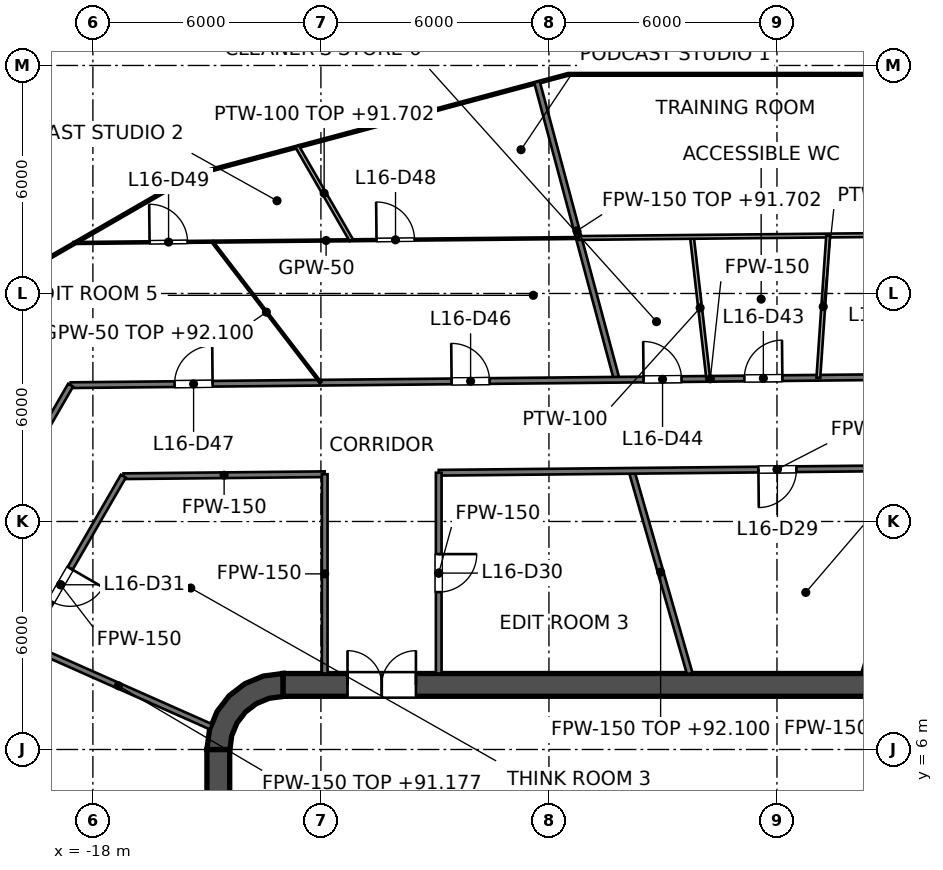
"""IFC4 building model, lengths in metres.
Left out: names, types, materials, properties, quantities, classifications, styles, units other than length and angle.
Written with IfcOpenShell. Run it as: python <this file> out.ifc"""

import sys

from ifc_helpers import new_model, si_unit, direction, frame, frame_2d, origin, place, context, subcontext, project, spatial, polyline, rectangle, outline, extrude, element, fill, save


model = new_model("IFC4")
c1 = context("Model", 3, precision=1e-05, world=origin(), true_north=direction((0.0, 1.0)))
c2 = subcontext(c1, "Body", "Model", "MODEL_VIEW")
j1 = project(units=[si_unit("LENGTHUNIT", "METRE"), si_unit("PLANEANGLEUNIT", "RADIAN")], contexts=[c1])
p1 = place(None, origin())
s1 = spatial("IfcSite", under=j1, at=p1, CompositionType="ELEMENT")
p2 = place(p1, origin())
s2 = spatial("IfcBuilding", under=s1, at=p2, CompositionType="ELEMENT")
p3 = place(p2, frame((0.0, 0.0, 88.2)))
s3 = spatial("IfcBuildingStorey", under=s2, at=p3, CompositionType="ELEMENT", Elevation=88.2)
p4 = place(p3, frame((-13.0, 7.7, 0.0), z_axis=(0.0, 0.0, 1.0), x_axis=(1.0, 0.0, 0.0)))
e1 = element("IfcWall", 1, at=p4, inside=s3, PredefinedType="SHEAR", context=c2, shape_type="SweptSolid", body=[
    extrude(rectangle(XDim=26.0, YDim=0.6, at=frame_2d((13.0, 0.0))), origin(), (0.0, 0.0, 1.0), 4.2),
])
p5 = place(p4, frame((1.7, 0.0, 0.0)))
e2 = element("IfcOpeningElement", 2, at=p5, cuts=e1, PredefinedType="OPENING", context=c2, shape_type="SweptSolid", body=[
    extrude(rectangle(XDim=1.8, YDim=2.1, at=frame_2d((0.9, 1.05))), frame((0.0, 0.3, 0.0), z_axis=(0.0, -1.0, 0.0), x_axis=(1.0, 0.0, 0.0)), (0.0, 0.0, 1.0), 0.6),
])
p6 = place(p4, frame((22.5, 0.0, 0.0)))
e3 = element("IfcOpeningElement", 3, at=p6, cuts=e1, PredefinedType="OPENING", context=c2, shape_type="SweptSolid", body=[
    extrude(rectangle(XDim=1.8, YDim=2.1, at=frame_2d((0.9, 1.05))), frame((0.0, 0.3, 0.0), z_axis=(0.0, -1.0, 0.0), x_axis=(1.0, 0.0, 0.0)), (0.0, 0.0, 1.0), 0.6),
])
p7 = place(p3, frame((-14.7, -6.0, 0.0), z_axis=(0.0, 0.0, 1.0), x_axis=(0.0, 1.0, 0.0)))
e4 = element("IfcWall", 4, at=p7, inside=s3, PredefinedType="SHEAR", context=c2, shape_type="SweptSolid", body=[
    extrude(rectangle(XDim=12.0, YDim=0.6, at=frame_2d((6.0, 0.0))), origin(), (0.0, 0.0, 1.0), 4.2),
])
p8 = place(p3, origin())
e5 = element("IfcWall", 5, at=p8, inside=s3, PredefinedType="SHEAR", context=c2, shape_type="SweptSolid", body=[
    extrude(outline(polyline([(-15.0, 6.0), (-14.395, 6.0), (-14.347, 6.361), (-14.208, 6.698), (-13.986, 6.986), (-13.698, 7.208), (-13.361, 7.347), (-13.0, 7.395), (-13.0, 8.0), (-13.518, 7.932), (-14.0, 7.732), (-14.414, 7.414), (-14.732, 7.0), (-14.932, 6.518), (-15.0, 6.0)])), origin(), (0.0, 0.0, 1.0), 4.2),
])
p9 = place(p3, frame((-1.5, 4.1, 0.0), z_axis=(0.0, 0.0, 1.0), x_axis=(0.0, 1.0, 0.0)))
e6 = element("IfcWall", 6, at=p9, inside=s3, PredefinedType="PARTITIONING", context=c2, shape_type="SweptSolid", body=[
    extrude(rectangle(XDim=2.5, YDim=0.15, at=frame_2d((1.25, 0.0))), origin(), (0.0, 0.0, 1.0), 3.9),
])
p10 = place(p9, frame((0.8, 0.0, 0.0)))
e7 = element("IfcOpeningElement", 7, at=p10, cuts=e6, PredefinedType="OPENING", context=c2, shape_type="SweptSolid", body=[
    extrude(rectangle(XDim=0.9, YDim=2.1, at=frame_2d((0.45, 1.05))), frame((0.0, 0.075, 0.0), z_axis=(0.0, -1.0, 0.0), x_axis=(1.0, 0.0, 0.0)), (0.0, 0.0, 1.0), 0.15),
])
p11 = place(p3, frame((-9.0, 4.1, 0.0), z_axis=(0.0, 0.0, 1.0), x_axis=(0.0, 1.0, 0.0)))
e8 = element("IfcWall", 8, at=p11, inside=s3, PredefinedType="SOLIDWALL", context=c2, shape_type="SweptSolid", body=[
    extrude(rectangle(XDim=2.5, YDim=0.25, at=frame_2d((1.25, 0.0))), origin(), (0.0, 0.0, 1.0), 4.05),
])
p12 = place(p11, frame((0.65, 0.0, 0.0)))
e9 = element("IfcOpeningElement", 9, at=p12, cuts=e8, PredefinedType="OPENING", context=c2, shape_type="SweptSolid", body=[
    extrude(rectangle(XDim=1.2, YDim=2.1, at=frame_2d((0.6, 1.05))), frame((0.0, 0.125, 0.0), z_axis=(0.0, -1.0, 0.0), x_axis=(1.0, 0.0, 0.0)), (0.0, 0.0, 1.0), 0.25),
])
p13 = place(p3, frame((-3.15, 4.1, 0.0), z_axis=(0.0, 0.0, 1.0), x_axis=(0.0, 1.0, 0.0)))
e10 = element("IfcWall", 10, at=p13, inside=s3, PredefinedType="SOLIDWALL", context=c2, shape_type="SweptSolid", body=[
    extrude(rectangle(XDim=2.5, YDim=0.25, at=frame_2d((1.25, 0.0))), origin(), (0.0, 0.0, 1.0), 4.05),
])
p14 = place(p3, frame((-9.125, 7.0, 0.0), z_axis=(0.0, 0.0, 1.0), x_axis=(1.0, 0.0, 0.0)))
e11 = element("IfcWall", 11, at=p14, inside=s3, PredefinedType="SOLIDWALL", context=c2, shape_type="SweptSolid", body=[
    extrude(rectangle(XDim=18.25, YDim=0.8, at=frame_2d((9.125, 0.0))), origin(), (0.0, 0.0, 1.0), 4.05),
])
p15 = place(p3, frame((-11.8, -7.4, 0.0), z_axis=(0.0, 0.0, 1.0), x_axis=(0.0, 1.0, 0.0)))
e12 = element("IfcWall", 12, at=p15, inside=s3, PredefinedType="SOLIDWALL", context=c2, shape_type="SweptSolid", body=[
    extrude(rectangle(XDim=14.8, YDim=0.4, at=frame_2d((7.4, 0.0))), origin(), (0.0, 0.0, 1.0), 4.05),
])
p16 = place(p15, frame((11.2, 0.0, 0.0)))
e13 = element("IfcOpeningElement", 13, at=p16, cuts=e12, PredefinedType="OPENING", context=c2, shape_type="SweptSolid", body=[
    extrude(rectangle(XDim=1.1, YDim=2.1, at=frame_2d((0.55, 1.05))), frame((0.0, 0.2, 0.0), z_axis=(0.0, -1.0, 0.0), x_axis=(1.0, 0.0, 0.0)), (0.0, 0.0, 1.0), 0.4),
])
p17 = place(p15, frame((8.3, 0.0, 0.0)))
e14 = element("IfcOpeningElement", 14, at=p17, cuts=e12, PredefinedType="OPENING", context=c2, shape_type="SweptSolid", body=[
    extrude(rectangle(XDim=1.1, YDim=2.1, at=frame_2d((0.55, 1.05))), frame((0.0, 0.2, 0.0), z_axis=(0.0, -1.0, 0.0), x_axis=(1.0, 0.0, 0.0)), (0.0, 0.0, 1.0), 0.4),
])
p18 = place(p15, frame((5.4, 0.0, 0.0)))
e15 = element("IfcOpeningElement", 15, at=p18, cuts=e12, PredefinedType="OPENING", context=c2, shape_type="SweptSolid", body=[
    extrude(rectangle(XDim=1.1, YDim=2.1, at=frame_2d((0.55, 1.05))), frame((0.0, 0.2, 0.0), z_axis=(0.0, -1.0, 0.0), x_axis=(1.0, 0.0, 0.0)), (0.0, 0.0, 1.0), 0.4),
])
p19 = place(p15, frame((13.552, 0.0, 0.0)))
e16 = element("IfcOpeningElement", 16, at=p19, cuts=e12, PredefinedType="OPENING", context=c2, shape_type="SweptSolid", body=[
    extrude(rectangle(XDim=0.9, YDim=2.1, at=frame_2d((0.45, 1.05))), frame((0.0, 0.2, 0.0), z_axis=(0.0, -1.0, 0.0), x_axis=(1.0, 0.0, 0.0)), (0.0, 0.0, 1.0), 0.4),
])
p20 = place(p15, frame((0.347, 0.0, 0.0)))
e17 = element("IfcOpeningElement", 17, at=p20, cuts=e12, PredefinedType="OPENING", context=c2, shape_type="SweptSolid", body=[
    extrude(rectangle(XDim=0.9, YDim=2.1, at=frame_2d((0.45, 1.05))), frame((0.0, 0.2, 0.0), z_axis=(0.0, -1.0, 0.0), x_axis=(1.0, 0.0, 0.0)), (0.0, 0.0, 1.0), 0.4),
])
e18 = element("IfcWall", 18, at=p8, inside=s3, PredefinedType="SOLIDWALL", context=c2, shape_type="SweptSolid", body=[
    extrude(outline(polyline([(-12.0, -5.925), (-12.0, -5.675), (-14.15, -5.675), (-14.15, -3.025), (-12.0, -3.025), (-12.0, -2.775), (-14.15, -2.775), (-14.15, -0.125), (-12.0, -0.125), (-12.0, 0.125), (-14.15, 0.125), (-14.15, 2.775), (-12.0, 2.775), (-12.0, 3.025), (-14.15, 3.025), (-14.15, 5.675), (-12.0, 5.675), (-12.0, 5.925), (-14.15, 5.925), (-14.4, 5.925), (-14.4, 5.675), (-14.4, 3.025), (-14.4, 2.775), (-14.4, 0.125), (-14.4, -0.125), (-14.4, -2.775), (-14.4, -3.025), (-14.4, -5.675), (-14.4, -5.925), (-14.15, -5.925), (-12.0, -5.925)])), origin(), (0.0, 0.0, 1.0), 4.05),
])
p21 = place(p3, frame((-6.315, 23.566, 0.0), z_axis=(0.0, 0.0, 1.0), x_axis=(0.258844392232, -0.96591903419, 0.0)))
e19 = element("IfcWall", 19, at=p21, inside=s3, PredefinedType="PARTITIONING", context=c2, shape_type="SweptSolid", body=[
    extrude(rectangle(XDim=8.112, YDim=0.15, at=frame_2d((4.056, 0.0))), origin(), (0.0, 0.0, 1.0), 3.502),
])
p22 = place(p3, frame((-3.827, 13.333, 0.0), z_axis=(0.0, 0.0, 1.0), x_axis=(0.275935525478, -0.961176147113, 0.0)))
e20 = element("IfcWall", 20, at=p22, inside=s3, PredefinedType="PARTITIONING", context=c2, shape_type="SweptSolid", body=[
    extrude(rectangle(XDim=5.548, YDim=0.15, at=frame_2d((2.774, 0.0))), origin(), (0.0, 0.0, 1.0), 3.9),
])
p23 = place(p3, frame((-19.76, 8.755, 0.0), z_axis=(0.0, 0.0, 1.0), x_axis=(0.91424834547, -0.405154245695, 0.0)))
e21 = element("IfcWall", 21, at=p23, inside=s3, PredefinedType="PARTITIONING", context=c2, shape_type="SweptSolid", body=[
    extrude(rectangle(XDim=5.318, YDim=0.15, at=frame_2d((2.659, 0.0))), origin(), (0.0, 0.0, 1.0), 2.977),
])
p24 = place(p3, frame((-17.194, 13.191, 0.0), z_axis=(0.0, 0.0, 1.0), x_axis=(0.999950853109, 0.009914200296, 0.0)))
e22 = element("IfcWall", 22, at=p24, inside=s3, PredefinedType="PARTITIONING", context=c2, shape_type="SweptSolid", body=[
    extrude(rectangle(XDim=5.294, YDim=0.15, at=frame_2d((2.647, 0.0))), origin(), (0.0, 0.0, 1.0), 2.968),
])
p25 = place(p3, frame((-8.9, 13.282, 0.0), z_axis=(0.0, 0.0, 1.0), x_axis=(0.999950834077, 0.009916119672, 0.0)))
e23 = element("IfcWall", 23, at=p25, inside=s3, PredefinedType="PARTITIONING", context=c2, shape_type="SweptSolid", body=[
    extrude(rectangle(XDim=17.801, YDim=0.15, at=frame_2d((8.9, 0.0))), origin(), (0.0, 0.0, 1.0), 2.968),
])
p26 = place(p25, frame((8.412, 0.0, 0.0)))
e24 = element("IfcOpeningElement", 24, at=p26, cuts=e23, PredefinedType="OPENING", context=c2, shape_type="SweptSolid", body=[
    extrude(rectangle(XDim=1.0, YDim=2.1, at=frame_2d((0.5, 1.05))), frame((0.0, 0.075, 0.0), z_axis=(0.0, -1.0, 0.0), x_axis=(1.0, 0.0, 0.0)), (0.0, 0.0, 1.0), 0.15),
])
p27 = place(p3, frame((-18.587, 15.587, 0.0), z_axis=(0.0, 0.0, 1.0), x_axis=(0.99995087003, 0.009912493396, 0.0)))
e25 = element("IfcWall", 25, at=p27, inside=s3, PredefinedType="PARTITIONING", context=c2, shape_type="SweptSolid", body=[
    extrude(rectangle(XDim=33.669, YDim=0.15, at=frame_2d((16.834, 0.0))), origin(), (0.0, 0.0, 1.0), 2.968),
])
p28 = place(p27, frame((21.034, 0.0, 0.0)))
e26 = element("IfcOpeningElement", 26, at=p28, cuts=e25, PredefinedType="OPENING", context=c2, shape_type="SweptSolid", body=[
    extrude(rectangle(XDim=1.0, YDim=2.1, at=frame_2d((0.5, 1.05))), frame((0.0, 0.075, 0.0), z_axis=(0.0, -1.0, 0.0), x_axis=(1.0, 0.0, 0.0)), (0.0, 0.0, 1.0), 0.15),
])
p29 = place(p27, frame((17.73, 0.0, 0.0)))
e27 = element("IfcOpeningElement", 27, at=p29, cuts=e25, PredefinedType="OPENING", context=c2, shape_type="SweptSolid", body=[
    extrude(rectangle(XDim=1.0, YDim=2.1, at=frame_2d((0.5, 1.05))), frame((0.0, 0.075, 0.0), z_axis=(0.0, -1.0, 0.0), x_axis=(1.0, 0.0, 0.0)), (0.0, 0.0, 1.0), 0.15),
])
p30 = place(p27, frame((15.077, 0.0, 0.0)))
e28 = element("IfcOpeningElement", 28, at=p30, cuts=e25, PredefinedType="OPENING", context=c2, shape_type="SweptSolid", body=[
    extrude(rectangle(XDim=1.0, YDim=2.1, at=frame_2d((0.5, 1.05))), frame((0.0, 0.075, 0.0), z_axis=(0.0, -1.0, 0.0), x_axis=(1.0, 0.0, 0.0)), (0.0, 0.0, 1.0), 0.15),
])
p31 = place(p27, frame((10.026, 0.0, 0.0)))
e29 = element("IfcOpeningElement", 29, at=p31, cuts=e25, PredefinedType="OPENING", context=c2, shape_type="SweptSolid", body=[
    extrude(rectangle(XDim=1.0, YDim=2.1, at=frame_2d((0.5, 1.05))), frame((0.0, 0.075, 0.0), z_axis=(0.0, -1.0, 0.0), x_axis=(1.0, 0.0, 0.0)), (0.0, 0.0, 1.0), 0.15),
])
p32 = place(p27, frame((2.737, 0.0, 0.0)))
e30 = element("IfcOpeningElement", 30, at=p32, cuts=e25, PredefinedType="OPENING", context=c2, shape_type="SweptSolid", body=[
    extrude(rectangle(XDim=1.0, YDim=2.1, at=frame_2d((0.5, 1.05))), frame((0.0, 0.075, 0.0), z_axis=(0.0, -1.0, 0.0), x_axis=(1.0, 0.0, 0.0)), (0.0, 0.0, 1.0), 0.15),
])
p33 = place(p3, frame((-20.5, 7.474, 0.0), z_axis=(0.0, 0.0, 1.0), x_axis=(0.500012665616, 0.866018091164, 0.0)))
e31 = element("IfcWall", 31, at=p33, inside=s3, PredefinedType="PARTITIONING", context=c2, shape_type="SweptSolid", body=[
    extrude(rectangle(XDim=6.602, YDim=0.15, at=frame_2d((3.301, 0.0))), origin(), (0.0, 0.0, 1.0), 2.968),
])
p34 = place(p33, frame((2.803, 0.0, 0.0)))
e32 = element("IfcOpeningElement", 32, at=p34, cuts=e31, PredefinedType="OPENING", context=c2, shape_type="SweptSolid", body=[
    extrude(rectangle(XDim=1.0, YDim=2.1, at=frame_2d((0.5, 1.05))), frame((0.0, 0.075, 0.0), z_axis=(0.0, -1.0, 0.0), x_axis=(1.0, 0.0, 0.0)), (0.0, 0.0, 1.0), 0.15),
])
p35 = place(p3, frame((-22.9, 8.117, 0.0), z_axis=(0.0, 0.0, 1.0), x_axis=(0.5000050195, 0.866022505755, 0.0)))
e33 = element("IfcWall", 33, at=p35, inside=s3, PredefinedType="PARTITIONING", context=c2, shape_type="SweptSolid", body=[
    extrude(rectangle(XDim=8.626, YDim=0.15, at=frame_2d((4.313, 0.0))), origin(), (0.0, 0.0, 1.0), 2.968),
])
p36 = place(p35, frame((3.211, 0.0, 0.0)))
e34 = element("IfcOpeningElement", 34, at=p36, cuts=e33, PredefinedType="OPENING", context=c2, shape_type="SweptSolid", body=[
    extrude(rectangle(XDim=1.0, YDim=2.1, at=frame_2d((0.5, 1.05))), frame((0.0, 0.075, 0.0), z_axis=(0.0, -1.0, 0.0), x_axis=(1.0, 0.0, 0.0)), (0.0, 0.0, 1.0), 0.15),
])
p37 = place(p3, frame((2.296, 8.0, 0.0), z_axis=(0.0, 0.0, 1.0), x_axis=(0.275958345059, 0.961169595749, 0.0)))
e35 = element("IfcWall", 35, at=p37, inside=s3, PredefinedType="PARTITIONING", context=c2, shape_type="SweptSolid", body=[
    extrude(rectangle(XDim=5.628, YDim=0.15, at=frame_2d((2.814, 0.0))), origin(), (0.0, 0.0, 1.0), 3.9),
])
p38 = place(p3, frame((-8.9, 8.0, 0.0), z_axis=(0.0, 0.0, 1.0), x_axis=(0.0, 1.0, 0.0)))
e36 = element("IfcWall", 36, at=p38, inside=s3, PredefinedType="PARTITIONING", context=c2, shape_type="SweptSolid", body=[
    extrude(rectangle(XDim=5.283, YDim=0.15, at=frame_2d((2.642, 0.0))), origin(), (0.0, 0.0, 1.0), 2.968),
])
p39 = place(p38, frame((2.142, 0.0, 0.0)))
e37 = element("IfcOpeningElement", 37, at=p39, cuts=e36, PredefinedType="OPENING", context=c2, shape_type="SweptSolid", body=[
    extrude(rectangle(XDim=1.0, YDim=2.1, at=frame_2d((0.5, 1.05))), frame((0.0, 0.075, 0.0), z_axis=(0.0, -1.0, 0.0), x_axis=(1.0, 0.0, 0.0)), (0.0, 0.0, 1.0), 0.15),
])
p40 = place(p3, frame((-11.9, 8.0, 0.0), z_axis=(0.0, 0.0, 1.0), x_axis=(0.0, 1.0, 0.0)))
e38 = element("IfcWall", 38, at=p40, inside=s3, PredefinedType="PARTITIONING", context=c2, shape_type="SweptSolid", body=[
    extrude(rectangle(XDim=5.243, YDim=0.15, at=frame_2d((2.622, 0.0))), origin(), (0.0, 0.0, 1.0), 2.968),
])
p41 = place(p3, frame((-14.859, 19.364, 0.0), z_axis=(0.0, 0.0, 1.0), x_axis=(0.608714147517, -0.793389618418, 0.0)))
e39 = element("IfcWall", 39, at=p41, inside=s3, PredefinedType="PARTITIONING", context=c2, shape_type="SweptSolid", body=[
    extrude(rectangle(XDim=4.678, YDim=0.05, at=frame_2d((2.339, 0.0))), origin(), (0.0, 0.0, 1.0), 3.9),
])
p42 = place(p3, frame((-18.512, 19.328, 0.0), z_axis=(0.0, 0.0, 1.0), x_axis=(0.999950851933, 0.009914318817, 0.0)))
e40 = element("IfcWall", 40, at=p42, inside=s3, PredefinedType="PARTITIONING", context=c2, shape_type="SweptSolid", body=[
    extrude(rectangle(XDim=13.298, YDim=0.05, at=frame_2d((6.649, 0.0))), origin(), (0.0, 0.0, 1.0), 2.968),
])
p43 = place(p42, frame((7.975, 0.0, 0.0)))
e41 = element("IfcOpeningElement", 41, at=p43, cuts=e40, PredefinedType="OPENING", context=c2, shape_type="SweptSolid", body=[
    extrude(rectangle(XDim=1.0, YDim=2.1, at=frame_2d((0.5, 1.05))), frame((0.0, 0.025, 0.0), z_axis=(0.0, -1.0, 0.0), x_axis=(1.0, 0.0, 0.0)), (0.0, 0.0, 1.0), 0.05),
])
p44 = place(p42, frame((2.003, 0.0, 0.0)))
e42 = element("IfcOpeningElement", 42, at=p44, cuts=e40, PredefinedType="OPENING", context=c2, shape_type="SweptSolid", body=[
    extrude(rectangle(XDim=1.0, YDim=2.1, at=frame_2d((0.5, 1.05))), frame((0.0, 0.025, 0.0), z_axis=(0.0, -1.0, 0.0), x_axis=(1.0, 0.0, 0.0)), (0.0, 0.0, 1.0), 0.05),
])
p45 = place(p3, frame((-2.237, 19.49, 0.0), z_axis=(0.0, 0.0, 1.0), x_axis=(0.114064733863, -0.993473319465, 0.0)))
e43 = element("IfcWall", 43, at=p45, inside=s3, PredefinedType="PARTITIONING", context=c2, shape_type="SweptSolid", body=[
    extrude(rectangle(XDim=3.761, YDim=0.1, at=frame_2d((1.88, 0.0))), origin(), (0.0, 0.0, 1.0), 3.9),
])
p46 = place(p3, frame((-12.629, 21.874, 0.0), z_axis=(0.0, 0.0, 1.0), x_axis=(0.500028324968, -0.866009049739, 0.0)))
e44 = element("IfcWall", 44, at=p46, inside=s3, PredefinedType="PARTITIONING", context=c2, shape_type="SweptSolid", body=[
    extrude(rectangle(XDim=2.856, YDim=0.1, at=frame_2d((1.428, 0.0))), origin(), (0.0, 0.0, 1.0), 3.502),
])
p47 = place(p3, frame((-5.215, 19.46, 0.0), z_axis=(0.0, 0.0, 1.0), x_axis=(0.999950988801, 0.00990050484, 0.0)))
e45 = element("IfcWall", 45, at=p47, inside=s3, PredefinedType="PARTITIONING", context=c2, shape_type="SweptSolid", body=[
    extrude(rectangle(XDim=21.281, YDim=0.1, at=frame_2d((10.641, 0.0))), origin(), (0.0, 0.0, 1.0), 2.968),
])
p48 = place(p47, frame((13.255, 0.0, 0.0)))
e46 = element("IfcOpeningElement", 46, at=p48, cuts=e45, PredefinedType="OPENING", context=c2, shape_type="SweptSolid", body=[
    extrude(rectangle(XDim=0.9, YDim=2.1, at=frame_2d((0.45, 1.05))), frame((0.0, 0.05, 0.0), z_axis=(0.0, -1.0, 0.0), x_axis=(1.0, 0.0, 0.0)), (0.0, 0.0, 1.0), 0.1),
])
p49 = place(p3, frame((1.089, 15.783, 0.0), z_axis=(0.0, 0.0, 1.0), x_axis=(0.068735075686, 0.99763494795, 0.0)))
e47 = element("IfcWall", 47, at=p49, inside=s3, PredefinedType="PARTITIONING", context=c2, shape_type="SweptSolid", body=[
    extrude(rectangle(XDim=3.751, YDim=0.1, at=frame_2d((1.875, 0.0))), origin(), (0.0, 0.0, 1.0), 3.9),
])
p50 = place(p12, origin())
e48 = element("IfcDoor", 48, at=p50, inside=s3, OperationType="SINGLE_SWING_RIGHT", PredefinedType="DOOR", context=c2, shape_type="SweptSolid", body=[
    extrude(rectangle(XDim=1.2, YDim=2.1, at=frame_2d((0.6, 1.05))), frame((0.0, 0.025, 0.0), z_axis=(0.0, -1.0, 0.0), x_axis=(1.0, 0.0, 0.0)), (0.0, 0.0, 1.0), 0.05),
])
fill(e9, e48)
p51 = place(p10, origin())
e49 = element("IfcDoor", 49, at=p51, inside=s3, OperationType="SINGLE_SWING_LEFT", PredefinedType="DOOR", context=c2, shape_type="SweptSolid", body=[
    extrude(rectangle(XDim=0.9, YDim=2.1, at=frame_2d((0.45, 1.05))), frame((0.0, 0.025, 0.0), z_axis=(0.0, -1.0, 0.0), x_axis=(1.0, 0.0, 0.0)), (0.0, 0.0, 1.0), 0.05),
])
fill(e7, e49)
p52 = place(p19, origin())
e50 = element("IfcDoor", 50, at=p52, inside=s3, OperationType="SINGLE_SWING_LEFT", PredefinedType="DOOR", context=c2, shape_type="SweptSolid", body=[
    extrude(rectangle(XDim=0.9, YDim=2.1, at=frame_2d((0.45, 1.05))), frame((0.0, 0.025, 0.0), z_axis=(0.0, -1.0, 0.0), x_axis=(1.0, 0.0, 0.0)), (0.0, 0.0, 1.0), 0.05),
])
fill(e16, e50)
p53 = place(p5, origin())
e51 = element("IfcDoor", 51, at=p53, inside=s3, OperationType="DOUBLE_DOOR_SINGLE_SWING", PredefinedType="DOOR", context=c2, shape_type="SweptSolid", body=[
    extrude(rectangle(XDim=1.8, YDim=2.1, at=frame_2d((0.9, 1.05))), frame((0.0, 0.025, 0.0), z_axis=(0.0, -1.0, 0.0), x_axis=(1.0, 0.0, 0.0)), (0.0, 0.0, 1.0), 0.05),
])
fill(e2, e51)
p54 = place(p26, origin())
e52 = element("IfcDoor", 52, at=p54, inside=s3, OperationType="SINGLE_SWING_LEFT", PredefinedType="DOOR", context=c2, shape_type="SweptSolid", body=[
    extrude(rectangle(XDim=1.0, YDim=2.1, at=frame_2d((0.5, 1.05))), frame((0.0, 0.025, 0.0), z_axis=(0.0, -1.0, 0.0), x_axis=(1.0, 0.0, 0.0)), (0.0, 0.0, 1.0), 0.05),
])
fill(e24, e52)
p55 = place(p39, origin())
e53 = element("IfcDoor", 53, at=p55, inside=s3, OperationType="SINGLE_SWING_RIGHT", PredefinedType="DOOR", context=c2, shape_type="SweptSolid", body=[
    extrude(rectangle(XDim=1.0, YDim=2.1, at=frame_2d((0.5, 1.05))), frame((0.0, 0.025, 0.0), z_axis=(0.0, -1.0, 0.0), x_axis=(1.0, 0.0, 0.0)), (0.0, 0.0, 1.0), 0.05),
])
fill(e37, e53)
p56 = place(p34, origin())
e54 = element("IfcDoor", 54, at=p56, inside=s3, OperationType="SINGLE_SWING_RIGHT", PredefinedType="DOOR", context=c2, shape_type="SweptSolid", body=[
    extrude(rectangle(XDim=1.0, YDim=2.1, at=frame_2d((0.5, 1.05))), frame((0.0, 0.025, 0.0), z_axis=(0.0, -1.0, 0.0), x_axis=(1.0, 0.0, 0.0)), (0.0, 0.0, 1.0), 0.05),
])
fill(e32, e54)
p57 = place(p29, origin())
e55 = element("IfcDoor", 55, at=p57, inside=s3, OperationType="SINGLE_SWING_RIGHT", PredefinedType="DOOR", context=c2, shape_type="SweptSolid", body=[
    extrude(rectangle(XDim=1.0, YDim=2.1, at=frame_2d((0.5, 1.05))), frame((0.0, 0.025, 0.0), z_axis=(0.0, -1.0, 0.0), x_axis=(1.0, 0.0, 0.0)), (0.0, 0.0, 1.0), 0.05),
])
fill(e27, e55)
p58 = place(p30, origin())
e56 = element("IfcDoor", 56, at=p58, inside=s3, OperationType="SINGLE_SWING_LEFT", PredefinedType="DOOR", context=c2, shape_type="SweptSolid", body=[
    extrude(rectangle(XDim=1.0, YDim=2.1, at=frame_2d((0.5, 1.05))), frame((0.0, 0.025, 0.0), z_axis=(0.0, -1.0, 0.0), x_axis=(1.0, 0.0, 0.0)), (0.0, 0.0, 1.0), 0.05),
])
fill(e28, e56)
p59 = place(p31, origin())
e57 = element("IfcDoor", 57, at=p59, inside=s3, OperationType="SINGLE_SWING_LEFT", PredefinedType="DOOR", context=c2, shape_type="SweptSolid", body=[
    extrude(rectangle(XDim=1.0, YDim=2.1, at=frame_2d((0.5, 1.05))), frame((0.0, 0.025, 0.0), z_axis=(0.0, -1.0, 0.0), x_axis=(1.0, 0.0, 0.0)), (0.0, 0.0, 1.0), 0.05),
])
fill(e29, e57)
p60 = place(p32, origin())
e58 = element("IfcDoor", 58, at=p60, inside=s3, OperationType="SINGLE_SWING_RIGHT", PredefinedType="DOOR", context=c2, shape_type="SweptSolid", body=[
    extrude(rectangle(XDim=1.0, YDim=2.1, at=frame_2d((0.5, 1.05))), frame((0.0, 0.025, 0.0), z_axis=(0.0, -1.0, 0.0), x_axis=(1.0, 0.0, 0.0)), (0.0, 0.0, 1.0), 0.05),
])
fill(e30, e58)
p61 = place(p43, origin())
e59 = element("IfcDoor", 59, at=p61, inside=s3, OperationType="SINGLE_SWING_LEFT", PredefinedType="DOOR", context=c2, shape_type="SweptSolid", body=[
    extrude(rectangle(XDim=1.0, YDim=2.1, at=frame_2d((0.5, 1.05))), frame((0.0, 0.025, 0.0), z_axis=(0.0, -1.0, 0.0), x_axis=(1.0, 0.0, 0.0)), (0.0, 0.0, 1.0), 0.05),
])
fill(e41, e59)
p62 = place(p44, origin())
e60 = element("IfcDoor", 60, at=p62, inside=s3, OperationType="SINGLE_SWING_LEFT", PredefinedType="DOOR", context=c2, shape_type="SweptSolid", body=[
    extrude(rectangle(XDim=1.0, YDim=2.1, at=frame_2d((0.5, 1.05))), frame((0.0, 0.025, 0.0), z_axis=(0.0, -1.0, 0.0), x_axis=(1.0, 0.0, 0.0)), (0.0, 0.0, 1.0), 0.05),
])
fill(e42, e60)
save(model, sys.argv[1])
